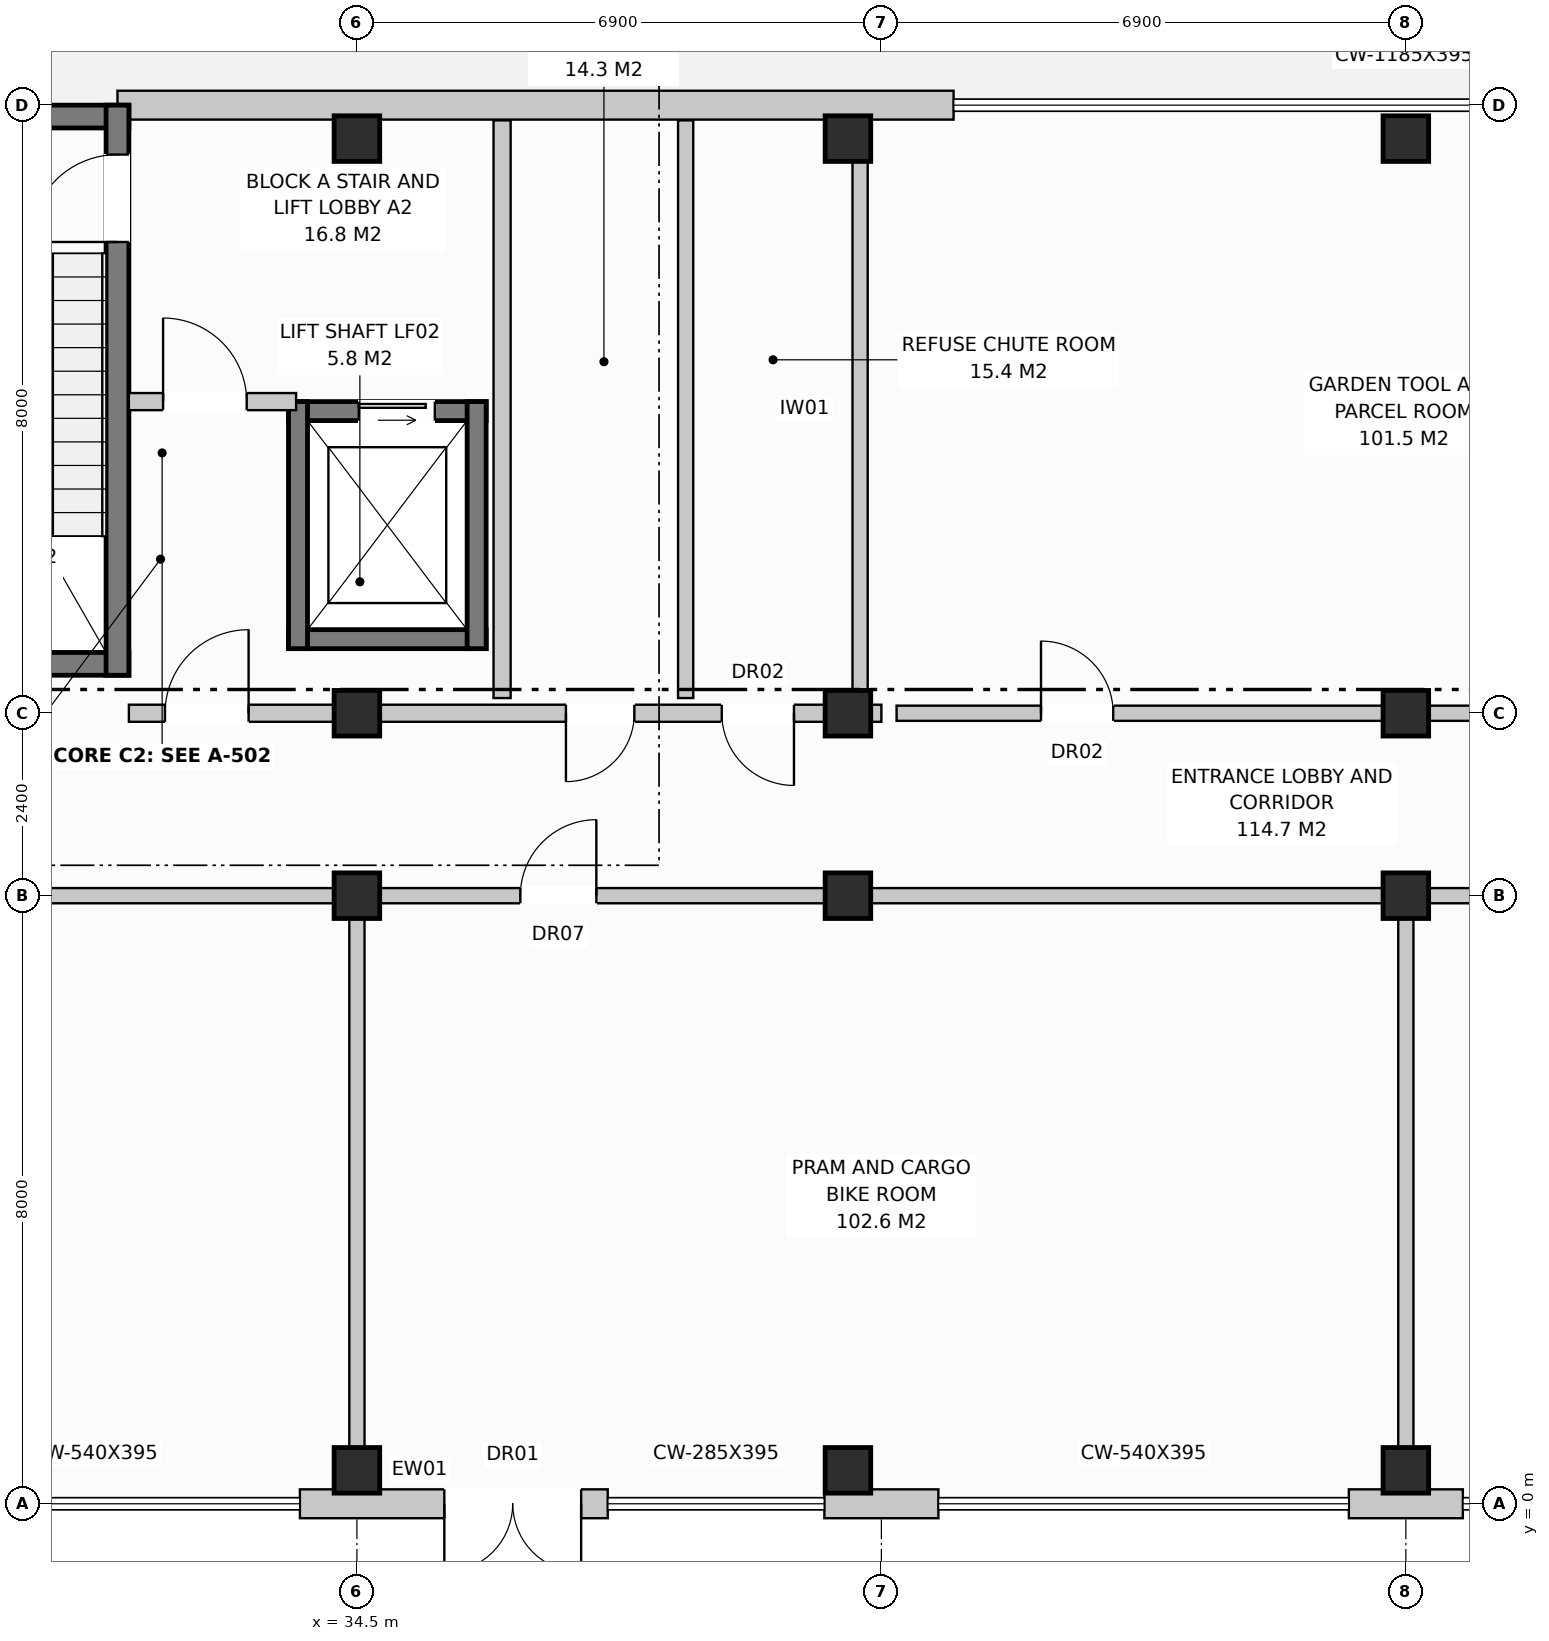
"""IFC4 building model, lengths in metres.
Left out: names, types, materials, properties, quantities, classifications, styles, units other than length and angle.
Written with IfcOpenShell. Run it as: python <this file> out.ifc"""

import sys

from ifc_helpers import new_model, si_unit, direction, frame, frame_2d, origin, origin_with_axes, origin_2d, place, context, subcontext, project, spatial, rectangle, extrude, element, fill, save


model = new_model("IFC4")
c1 = context("Model", 3, precision=1e-05, world=origin(), true_north=direction((0.0, 1.0)))
c2 = subcontext(c1, "Body", "Model", "MODEL_VIEW")
j1 = project(units=[si_unit("LENGTHUNIT", "METRE"), si_unit("PLANEANGLEUNIT", "RADIAN")], contexts=[c1])
p1 = place(None, origin())
s1 = spatial("IfcSite", under=j1, at=p1, CompositionType="ELEMENT")
p2 = place(p1, origin())
s2 = spatial("IfcBuilding", under=s1, at=p2, CompositionType="ELEMENT")
p3 = place(p2, origin())
s3 = spatial("IfcBuildingStorey", under=s2, at=p3, CompositionType="ELEMENT", Elevation=0.0)
for number, where, z_axis, x_axis in (
    (1, (34.5, 0.44, 0.0), (0.0, 0.0, 1.0), (1.0, 0.0, 0.0)),
    (2, (34.5, 8.0, 0.0), (0.0, 0.0, 1.0), (1.0, 0.0, 0.0)),
    (3, (34.5, 10.4, 0.0), (0.0, 0.0, 1.0), (1.0, 0.0, 0.0)),
    (4, (34.5, 17.96, 0.0), (0.0, 0.0, 1.0), (1.0, 0.0, 0.0)),
    (5, (40.96, 0.44, 0.0), (0.0, 0.0, 1.0), (1.0, 0.0, 0.0)),
    (6, (40.96, 8.0, 0.0), (0.0, 0.0, 1.0), (1.0, 0.0, 0.0)),
    (7, (40.96, 10.4, 0.0), (0.0, 0.0, 1.0), (1.0, 0.0, 0.0)),
    (8, (40.96, 17.96, 0.0), (0.0, 0.0, 1.0), (1.0, 0.0, 0.0)),
    (9, (48.3, 0.44, 0.0), (0.0, 0.0, 1.0), (1.0, 0.0, 0.0)),
    (10, (48.3, 8.0, 0.0), (0.0, 0.0, 1.0), (1.0, 0.0, 0.0)),
    (11, (48.3, 10.4, 0.0), (0.0, 0.0, 1.0), (1.0, 0.0, 0.0)),
    (12, (48.3, 17.96, 0.0), (0.0, 0.0, 1.0), (1.0, 0.0, 0.0)),
):
    element("IfcColumn", number, at=place(p3, frame(where, z_axis=z_axis, x_axis=x_axis)), inside=s3, PredefinedType="COLUMN", context=c2, shape_type="SweptSolid", body=[
        extrude(rectangle(XDim=0.6, YDim=0.6, at=origin_2d()), origin(), (0.0, 0.0, 1.0), 4.4),
    ])
p4 = place(p3, frame((33.75, 0.0, 0.0), z_axis=(0.0, 0.0, 1.0), x_axis=(1.0, 0.0, 0.0)))
e13 = element("IfcWall", 13, at=p4, inside=s3, PredefinedType="STANDARD", context=c2, shape_type="SweptSolid", body=[
    extrude(rectangle(XDim=4.05, YDim=0.38, at=frame_2d((2.025, 0.0))), origin(), (0.0, 0.0, 1.0), 4.12),
])
p5 = place(p4, frame((1.9, 0.0, 0.0)))
e14 = element("IfcOpeningElement", 14, at=p5, cuts=e13, PredefinedType="OPENING", context=c2, shape_type="SweptSolid", body=[
    extrude(rectangle(XDim=1.8, YDim=2.4, at=frame_2d((0.9, 1.2))), frame((0.0, 0.202, 0.0), z_axis=(0.0, -1.0, 0.0), x_axis=(1.0, 0.0, 0.0)), (0.0, 0.0, 1.0), 0.404),
])
for number, where, z_axis, x_axis in (
    (15, (40.65, 0.0, 0.0), (0.0, 0.0, 1.0), (1.0, 0.0, 0.0)),
    (16, (47.55, 0.0, 0.0), (0.0, 0.0, 1.0), (1.0, 0.0, 0.0)),
):
    element("IfcWall", number, at=place(p3, frame(where, z_axis=z_axis, x_axis=x_axis)), inside=s3, PredefinedType="STANDARD", context=c2, shape_type="SweptSolid", body=[
        extrude(rectangle(XDim=1.5, YDim=0.38, at=frame_2d((0.75, 0.0))), origin(), (0.0, 0.0, 1.0), 4.12),
    ])
p6 = place(p3, frame((31.35, 18.4, 0.0), z_axis=(0.0, 0.0, 1.0), x_axis=(1.0, 0.0, 0.0)))
e17 = element("IfcWall", 17, at=p6, inside=s3, PredefinedType="STANDARD", context=c2, shape_type="SweptSolid", body=[
    extrude(rectangle(XDim=11.0, YDim=0.38, at=frame_2d((5.5, 0.0))), origin(), (0.0, 0.0, 1.0), 4.12),
])
p7 = place(p3, frame((27.9, 18.25, 0.0), z_axis=(0.0, 0.0, 1.0), x_axis=(1.0, 0.0, 0.0)))
e18 = element("IfcWall", 18, at=p7, inside=s3, PredefinedType="SHEAR", context=c2, shape_type="SweptSolid", body=[
    extrude(rectangle(XDim=3.6, YDim=0.3, at=frame_2d((1.8, 0.0))), origin(), (0.0, 0.0, 1.0), 4.12),
])
p8 = place(p7, frame((1.1, 0.0, 0.0)))
e19 = element("IfcOpeningElement", 19, at=p8, cuts=e18, PredefinedType="OPENING", context=c2, shape_type="SweptSolid", body=[
    extrude(rectangle(XDim=1.4, YDim=2.25, at=frame_2d((0.7, 1.125))), frame((0.0, 0.162, 0.0), z_axis=(0.0, -1.0, 0.0), x_axis=(1.0, 0.0, 0.0)), (0.0, 0.0, 1.0), 0.324),
])
p9 = place(p3, frame((27.9, 11.05, 0.0), z_axis=(0.0, 0.0, 1.0), x_axis=(1.0, 0.0, 0.0)))
e20 = element("IfcWall", 20, at=p9, inside=s3, PredefinedType="SHEAR", context=c2, shape_type="SweptSolid", body=[
    extrude(rectangle(XDim=3.6, YDim=0.3, at=frame_2d((1.8, 0.0))), origin(), (0.0, 0.0, 1.0), 4.12),
])
p10 = place(p3, frame((31.35, 10.9, 0.0), z_axis=(0.0, 0.0, 1.0), x_axis=(0.0, 1.0, 0.0)))
e21 = element("IfcWall", 21, at=p10, inside=s3, PredefinedType="SHEAR", context=c2, shape_type="SweptSolid", body=[
    extrude(rectangle(XDim=7.5, YDim=0.3, at=frame_2d((3.75, 0.0))), origin(), (0.0, 0.0, 1.0), 4.12),
])
p11 = place(p10, frame((5.7, 0.0, 0.0)))
e22 = element("IfcOpeningElement", 22, at=p11, cuts=e21, PredefinedType="OPENING", context=c2, shape_type="SweptSolid", body=[
    extrude(rectangle(XDim=1.15, YDim=2.15, at=frame_2d((0.575, 1.075))), frame((0.0, 0.162, 0.0), z_axis=(0.0, -1.0, 0.0), x_axis=(1.0, 0.0, 0.0)), (0.0, 0.0, 1.0), 0.324),
])
p12 = place(p3, frame((33.6, 14.375, 0.0), z_axis=(0.0, 0.0, 1.0), x_axis=(1.0, 0.0, 0.0)))
e23 = element("IfcWall", 23, at=p12, inside=s3, PredefinedType="SHEAR", context=c2, shape_type="SweptSolid", body=[
    extrude(rectangle(XDim=2.6, YDim=0.25, at=frame_2d((1.3, 0.0))), origin(), (0.0, 0.0, 1.0), 4.12),
])
p13 = place(p12, frame((0.925, 0.0, 0.0)))
e24 = element("IfcOpeningElement", 24, at=p13, cuts=e23, PredefinedType="OPENING", context=c2, shape_type="SweptSolid", body=[
    extrude(rectangle(XDim=1.0, YDim=2.1, at=frame_2d((0.5, 1.05))), frame((0.0, 0.137, 0.0), z_axis=(0.0, -1.0, 0.0), x_axis=(1.0, 0.0, 0.0)), (0.0, 0.0, 1.0), 0.274),
])
p14 = place(p3, frame((33.6, 11.375, 0.0), z_axis=(0.0, 0.0, 1.0), x_axis=(1.0, 0.0, 0.0)))
e25 = element("IfcWall", 25, at=p14, inside=s3, PredefinedType="SHEAR", context=c2, shape_type="SweptSolid", body=[
    extrude(rectangle(XDim=2.6, YDim=0.25, at=frame_2d((1.3, 0.0))), origin(), (0.0, 0.0, 1.0), 4.12),
])
for number, where, z_axis, x_axis in (
    (26, (33.725, 11.25, 0.0), (0.0, 0.0, 1.0), (0.0, 1.0, 0.0)),
    (27, (36.075, 11.25, 0.0), (0.0, 0.0, 1.0), (0.0, 1.0, 0.0)),
):
    element("IfcWall", number, at=place(p3, frame(where, z_axis=z_axis, x_axis=x_axis)), inside=s3, PredefinedType="SHEAR", context=c2, shape_type="SweptSolid", body=[
        extrude(rectangle(XDim=3.25, YDim=0.25, at=frame_2d((1.625, 0.0))), origin(), (0.0, 0.0, 1.0), 4.12),
    ])
p15 = place(p3, frame((36.41, 10.6, 0.0), z_axis=(0.0, 0.0, 1.0), x_axis=(0.0, 1.0, 0.0)))
e28 = element("IfcWall", 28, at=p15, inside=s3, PredefinedType="PARTITIONING", context=c2, shape_type="SweptSolid", body=[
    extrude(rectangle(XDim=7.6, YDim=0.225, at=frame_2d((3.8, 0.0))), origin(), (0.0, 0.0, 1.0), 4.12),
])
p16 = place(p3, frame((31.5, 14.5, 0.0), z_axis=(0.0, 0.0, 1.0), x_axis=(1.0, 0.0, 0.0)))
e29 = element("IfcWall", 29, at=p16, inside=s3, PredefinedType="PARTITIONING", context=c2, shape_type="SweptSolid", body=[
    extrude(rectangle(XDim=2.2, YDim=0.225, at=frame_2d((1.1, 0.0))), origin(), (0.0, 0.0, 1.0), 4.12),
])
p17 = place(p16, frame((0.45, 0.0, 0.0)))
e30 = element("IfcOpeningElement", 30, at=p17, cuts=e29, PredefinedType="OPENING", context=c2, shape_type="SweptSolid", body=[
    extrude(rectangle(XDim=1.1, YDim=2.15, at=frame_2d((0.55, 1.075))), frame((0.0, 0.125, 0.0), z_axis=(0.0, -1.0, 0.0), x_axis=(1.0, 0.0, 0.0)), (0.0, 0.0, 1.0), 0.249),
])
for number, where, z_axis, x_axis in (
    (31, (38.825, 10.6, 0.0), (0.0, 0.0, 1.0), (0.0, 1.0, 0.0)),
    (32, (41.12, 10.6, 0.0), (0.0, 0.0, 1.0), (0.0, 1.0, 0.0)),
):
    element("IfcWall", number, at=place(p3, frame(where, z_axis=z_axis, x_axis=x_axis)), inside=s3, PredefinedType="PARTITIONING", context=c2, shape_type="SweptSolid", body=[
        extrude(rectangle(XDim=7.6, YDim=0.2, at=frame_2d((3.8, 0.0))), origin(), (0.0, 0.0, 1.0), 4.12),
    ])
p18 = place(p3, frame((31.5, 10.4, 0.0), z_axis=(0.0, 0.0, 1.0), x_axis=(1.0, 0.0, 0.0)))
e33 = element("IfcWall", 33, at=p18, inside=s3, PredefinedType="PARTITIONING", context=c2, shape_type="SweptSolid", body=[
    extrude(rectangle(XDim=9.9, YDim=0.225, at=frame_2d((4.95, 0.0))), origin(), (0.0, 0.0, 1.0), 3.56),
])
p19 = place(p18, frame((0.475, 0.0, 0.0)))
e34 = element("IfcOpeningElement", 34, at=p19, cuts=e33, PredefinedType="OPENING", context=c2, shape_type="SweptSolid", body=[
    extrude(rectangle(XDim=1.1, YDim=2.15, at=frame_2d((0.55, 1.075))), frame((0.0, 0.125, 0.0), z_axis=(0.0, -1.0, 0.0), x_axis=(1.0, 0.0, 0.0)), (0.0, 0.0, 1.0), 0.249),
])
p20 = place(p18, frame((5.75, 0.0, 0.0)))
e35 = element("IfcOpeningElement", 35, at=p20, cuts=e33, PredefinedType="OPENING", context=c2, shape_type="SweptSolid", body=[
    extrude(rectangle(XDim=0.9, YDim=2.1, at=frame_2d((0.45, 1.05))), frame((0.0, 0.125, 0.0), z_axis=(0.0, -1.0, 0.0), x_axis=(1.0, 0.0, 0.0)), (0.0, 0.0, 1.0), 0.249),
])
p21 = place(p18, frame((7.8, 0.0, 0.0)))
e36 = element("IfcOpeningElement", 36, at=p21, cuts=e33, PredefinedType="OPENING", context=c2, shape_type="SweptSolid", body=[
    extrude(rectangle(XDim=0.95, YDim=2.15, at=frame_2d((0.475, 1.075))), frame((0.0, 0.125, 0.0), z_axis=(0.0, -1.0, 0.0), x_axis=(1.0, 0.0, 0.0)), (0.0, 0.0, 1.0), 0.249),
])
p22 = place(p3, frame((20.85, 8.0, 0.0), z_axis=(0.0, 0.0, 1.0), x_axis=(1.0, 0.0, 0.0)))
e37 = element("IfcWall", 37, at=p22, inside=s3, PredefinedType="PARTITIONING", context=c2, shape_type="SweptSolid", body=[
    extrude(rectangle(XDim=13.5, YDim=0.2, at=frame_2d((6.75, 0.0))), origin(), (0.0, 0.0, 1.0), 3.56),
])
p23 = place(p22, frame((2.0, 0.0, 0.0)))
e38 = element("IfcOpeningElement", 38, at=p23, cuts=e37, PredefinedType="OPENING", context=c2, shape_type="SweptSolid", body=[
    extrude(rectangle(XDim=1.0, YDim=2.15, at=frame_2d((0.5, 1.075))), frame((0.0, 0.112, 0.0), z_axis=(0.0, -1.0, 0.0), x_axis=(1.0, 0.0, 0.0)), (0.0, 0.0, 1.0), 0.224),
])
p24 = place(p3, frame((34.5, 0.25, 0.0), z_axis=(0.0, 0.0, 1.0), x_axis=(0.0, 1.0, 0.0)))
e39 = element("IfcWall", 39, at=p24, inside=s3, PredefinedType="PARTITIONING", context=c2, shape_type="SweptSolid", body=[
    extrude(rectangle(XDim=7.6, YDim=0.2, at=frame_2d((3.8, 0.0))), origin(), (0.0, 0.0, 1.0), 4.12),
])
p25 = place(p3, frame((34.65, 8.0, 0.0), z_axis=(0.0, 0.0, 1.0), x_axis=(1.0, 0.0, 0.0)))
e40 = element("IfcWall", 40, at=p25, inside=s3, PredefinedType="PARTITIONING", context=c2, shape_type="SweptSolid", body=[
    extrude(rectangle(XDim=13.5, YDim=0.2, at=frame_2d((6.75, 0.0))), origin(), (0.0, 0.0, 1.0), 3.56),
])
p26 = place(p25, frame((2.0, 0.0, 0.0)))
e41 = element("IfcOpeningElement", 41, at=p26, cuts=e40, PredefinedType="OPENING", context=c2, shape_type="SweptSolid", body=[
    extrude(rectangle(XDim=1.0, YDim=2.15, at=frame_2d((0.5, 1.075))), frame((0.0, 0.112, 0.0), z_axis=(0.0, -1.0, 0.0), x_axis=(1.0, 0.0, 0.0)), (0.0, 0.0, 1.0), 0.224),
])
p27 = place(p3, frame((48.3, 0.25, 0.0), z_axis=(0.0, 0.0, 1.0), x_axis=(0.0, 1.0, 0.0)))
e42 = element("IfcWall", 42, at=p27, inside=s3, PredefinedType="PARTITIONING", context=c2, shape_type="SweptSolid", body=[
    extrude(rectangle(XDim=7.6, YDim=0.2, at=frame_2d((3.8, 0.0))), origin(), (0.0, 0.0, 1.0), 3.56),
])
p28 = place(p3, frame((48.45, 8.0, 0.0), z_axis=(0.0, 0.0, 1.0), x_axis=(1.0, 0.0, 0.0)))
e43 = element("IfcWall", 43, at=p28, inside=s3, PredefinedType="PARTITIONING", context=c2, shape_type="SweptSolid", body=[
    extrude(rectangle(XDim=6.45, YDim=0.2, at=frame_2d((3.225, 0.0))), origin(), (0.0, 0.0, 1.0), 3.56),
])
p29 = place(p28, frame((2.0, 0.0, 0.0)))
e44 = element("IfcOpeningElement", 44, at=p29, cuts=e43, PredefinedType="OPENING", context=c2, shape_type="SweptSolid", body=[
    extrude(rectangle(XDim=1.0, YDim=2.15, at=frame_2d((0.5, 1.075))), frame((0.0, 0.112, 0.0), z_axis=(0.0, -1.0, 0.0), x_axis=(1.0, 0.0, 0.0)), (0.0, 0.0, 1.0), 0.224),
])
p30 = place(p3, frame((41.6, 10.4, 0.0), z_axis=(0.0, 0.0, 1.0), x_axis=(1.0, 0.0, 0.0)))
e45 = element("IfcWall", 45, at=p30, inside=s3, PredefinedType="PARTITIONING", context=c2, shape_type="SweptSolid", body=[
    extrude(rectangle(XDim=13.35, YDim=0.2, at=frame_2d((6.675, 0.0))), origin(), (0.0, 0.0, 1.0), 3.56),
])
p31 = place(p30, frame((1.9, 0.0, 0.0)))
e46 = element("IfcOpeningElement", 46, at=p31, cuts=e45, PredefinedType="OPENING", context=c2, shape_type="SweptSolid", body=[
    extrude(rectangle(XDim=0.95, YDim=2.15, at=frame_2d((0.475, 1.075))), frame((0.0, 0.112, 0.0), z_axis=(0.0, -1.0, 0.0), x_axis=(1.0, 0.0, 0.0)), (0.0, 0.0, 1.0), 0.224),
])
p32 = place(p5, frame((1.8, 0.0, 0.0), z_axis=(0.0, 0.0, 1.0), x_axis=(-1.0, 0.0, 0.0)))
e47 = element("IfcDoor", 47, at=p32, inside=s3, OperationType="DOUBLE_DOOR_SINGLE_SWING", PredefinedType="DOOR", context=c2, shape_type="SweptSolid", body=[
    extrude(rectangle(XDim=1.8, YDim=2.4, at=frame_2d((0.9, 1.2))), frame((0.0, 0.025, 0.0), z_axis=(0.0, -1.0, 0.0), x_axis=(1.0, 0.0, 0.0)), (0.0, 0.0, 1.0), 0.05),
])
fill(e14, e47)
p33 = place(p11, origin_with_axes())
e48 = element("IfcDoor", 48, at=p33, inside=s3, OperationType="SINGLE_SWING_LEFT", PredefinedType="DOOR", context=c2, shape_type="SweptSolid", body=[
    extrude(rectangle(XDim=1.15, YDim=2.15, at=frame_2d((0.575, 1.075))), frame((0.0, 0.025, 0.0), z_axis=(0.0, -1.0, 0.0), x_axis=(1.0, 0.0, 0.0)), (0.0, 0.0, 1.0), 0.05),
])
fill(e22, e48)
p34 = place(p13, origin_with_axes())
e49 = element("IfcDoor", 49, at=p34, inside=s3, OperationType="SLIDING_TO_LEFT", PredefinedType="DOOR", context=c2, shape_type="SweptSolid", body=[
    extrude(rectangle(XDim=1.0, YDim=2.1, at=frame_2d((0.5, 1.05))), frame((0.0, 0.025, 0.0), z_axis=(0.0, -1.0, 0.0), x_axis=(1.0, 0.0, 0.0)), (0.0, 0.0, 1.0), 0.05),
])
fill(e24, e49)
p35 = place(p17, origin_with_axes())
e50 = element("IfcDoor", 50, at=p35, inside=s3, OperationType="SINGLE_SWING_LEFT", PredefinedType="DOOR", context=c2, shape_type="SweptSolid", body=[
    extrude(rectangle(XDim=1.1, YDim=2.15, at=frame_2d((0.55, 1.075))), frame((0.0, 0.025, 0.0), z_axis=(0.0, -1.0, 0.0), x_axis=(1.0, 0.0, 0.0)), (0.0, 0.0, 1.0), 0.05),
])
fill(e30, e50)
p36 = place(p19, origin_with_axes())
e51 = element("IfcDoor", 51, at=p36, inside=s3, OperationType="SINGLE_SWING_RIGHT", PredefinedType="DOOR", context=c2, shape_type="SweptSolid", body=[
    extrude(rectangle(XDim=1.1, YDim=2.15, at=frame_2d((0.55, 1.075))), frame((0.0, 0.025, 0.0), z_axis=(0.0, -1.0, 0.0), x_axis=(1.0, 0.0, 0.0)), (0.0, 0.0, 1.0), 0.05),
])
fill(e34, e51)
p37 = place(p20, frame((0.9, 0.0, 0.0), z_axis=(0.0, 0.0, 1.0), x_axis=(-1.0, 0.0, 0.0)))
e52 = element("IfcDoor", 52, at=p37, inside=s3, OperationType="SINGLE_SWING_LEFT", PredefinedType="DOOR", context=c2, shape_type="SweptSolid", body=[
    extrude(rectangle(XDim=0.9, YDim=2.1, at=frame_2d((0.45, 1.05))), frame((0.0, 0.025, 0.0), z_axis=(0.0, -1.0, 0.0), x_axis=(1.0, 0.0, 0.0)), (0.0, 0.0, 1.0), 0.05),
])
fill(e35, e52)
p38 = place(p21, frame((0.95, 0.0, 0.0), z_axis=(0.0, 0.0, 1.0), x_axis=(-1.0, 0.0, 0.0)))
e53 = element("IfcDoor", 53, at=p38, inside=s3, OperationType="SINGLE_SWING_RIGHT", PredefinedType="DOOR", context=c2, shape_type="SweptSolid", body=[
    extrude(rectangle(XDim=0.95, YDim=2.15, at=frame_2d((0.475, 1.075))), frame((0.0, 0.025, 0.0), z_axis=(0.0, -1.0, 0.0), x_axis=(1.0, 0.0, 0.0)), (0.0, 0.0, 1.0), 0.05),
])
fill(e36, e53)
p39 = place(p26, origin_with_axes())
e54 = element("IfcDoor", 54, at=p39, inside=s3, OperationType="SINGLE_SWING_RIGHT", PredefinedType="DOOR", context=c2, shape_type="SweptSolid", body=[
    extrude(rectangle(XDim=1.0, YDim=2.15, at=frame_2d((0.5, 1.075))), frame((0.0, 0.025, 0.0), z_axis=(0.0, -1.0, 0.0), x_axis=(1.0, 0.0, 0.0)), (0.0, 0.0, 1.0), 0.05),
])
fill(e41, e54)
p40 = place(p31, origin_with_axes())
e55 = element("IfcDoor", 55, at=p40, inside=s3, OperationType="SINGLE_SWING_LEFT", PredefinedType="DOOR", context=c2, shape_type="SweptSolid", body=[
    extrude(rectangle(XDim=0.95, YDim=2.15, at=frame_2d((0.475, 1.075))), frame((0.0, 0.025, 0.0), z_axis=(0.0, -1.0, 0.0), x_axis=(1.0, 0.0, 0.0)), (0.0, 0.0, 1.0), 0.05),
])
fill(e46, e55)
save(model, sys.argv[1])
